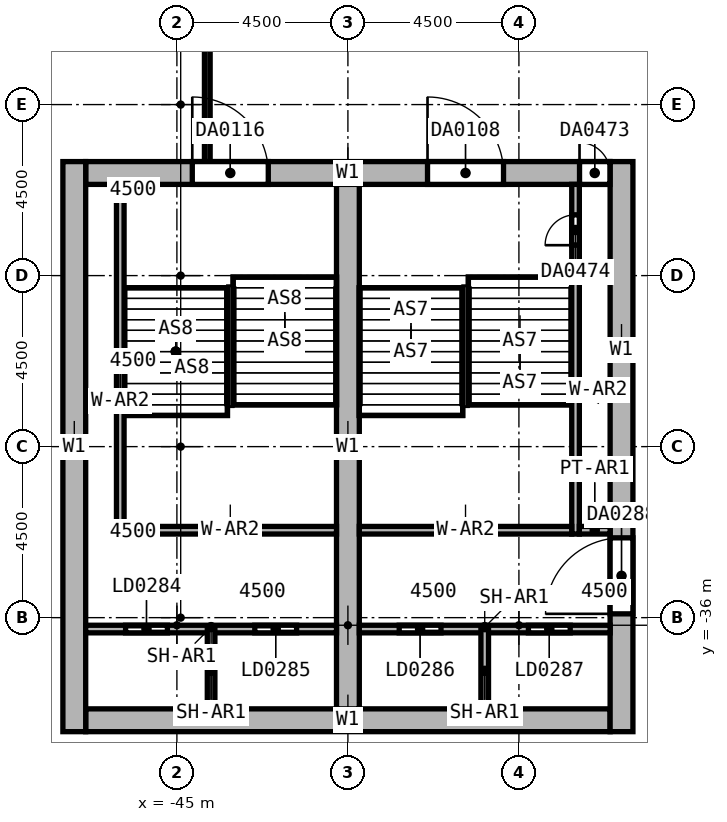
"""IFC4 building model, lengths in metres.
Left out: names, types, materials, properties, quantities, classifications, styles, units other than length and angle.
Written with IfcOpenShell. Run it as: python <this file> out.ifc"""

import sys

from ifc_helpers import new_model, si_unit, direction, frame, frame_2d, origin, place, context, subcontext, project, spatial, rectangle, extrude, element, fill, save


model = new_model("IFC4")
c1 = context("Model", 3, precision=1e-05, world=origin(), true_north=direction((0.0, 1.0)))
c2 = subcontext(c1, "Body", "Model", "MODEL_VIEW")
j1 = project(units=[si_unit("LENGTHUNIT", "METRE"), si_unit("PLANEANGLEUNIT", "RADIAN")], contexts=[c1])
p1 = place(None, origin())
s1 = spatial("IfcSite", under=j1, at=p1, CompositionType="ELEMENT")
p2 = place(p1, origin())
s2 = spatial("IfcBuilding", under=s1, at=p2, CompositionType="ELEMENT")
p3 = place(p2, frame((0.0, 0.0, 52.0)))
s3 = spatial("IfcBuildingStorey", under=s2, at=p3, CompositionType="ELEMENT", Elevation=52.0)
p4 = place(p3, frame((-47.4, -24.3, 0.0), z_axis=(0.0, 0.0, 1.0), x_axis=(1.0, 0.0, 0.0)))
e1 = element("IfcWall", 1, at=p4, inside=s3, PredefinedType="SHEAR", context=c2, shape_type="SweptSolid", body=[
    extrude(rectangle(XDim=13.8, YDim=0.6, at=frame_2d((6.9, 0.0))), origin(), (0.0, 0.0, 1.0), 8.0),
])
p5 = place(p4, frame((8.995, 0.0, 0.0)))
e2 = element("IfcOpeningElement", 2, at=p5, cuts=e1, PredefinedType="OPENING", context=c2, shape_type="SweptSolid", body=[
    extrude(rectangle(XDim=2.0, YDim=2.4, at=frame_2d((1.0, 1.2))), frame((0.0, 0.3, 0.0), z_axis=(0.0, -1.0, 0.0), x_axis=(1.0, 0.0, 0.0)), (0.0, 0.0, 1.0), 0.6),
])
p6 = place(p4, frame((2.805, 0.0, 0.0)))
e3 = element("IfcOpeningElement", 3, at=p6, cuts=e1, PredefinedType="OPENING", context=c2, shape_type="SweptSolid", body=[
    extrude(rectangle(XDim=2.0, YDim=2.4, at=frame_2d((1.0, 1.2))), frame((0.0, 0.3, 0.0), z_axis=(0.0, -1.0, 0.0), x_axis=(1.0, 0.0, 0.0)), (0.0, 0.0, 1.0), 0.6),
])
p7 = place(p4, frame((12.995, 0.0, 0.0)))
e4 = element("IfcOpeningElement", 4, at=p7, cuts=e1, PredefinedType="OPENING", context=c2, shape_type="SweptSolid", body=[
    extrude(rectangle(XDim=0.8, YDim=2.1, at=frame_2d((0.4, 1.05))), frame((0.0, 0.3, 0.0), z_axis=(0.0, -1.0, 0.0), x_axis=(1.0, 0.0, 0.0)), (0.0, 0.0, 1.0), 0.6),
])
p8 = place(p3, frame((-47.4, -38.7, 0.0), z_axis=(0.0, 0.0, 1.0), x_axis=(1.0, 0.0, 0.0)))
e5 = element("IfcWall", 5, at=p8, inside=s3, PredefinedType="SHEAR", context=c2, shape_type="SweptSolid", body=[
    extrude(rectangle(XDim=13.8, YDim=0.6, at=frame_2d((6.9, 0.0))), origin(), (0.0, 0.0, 1.0), 8.0),
])
p9 = place(p3, frame((-47.7, -39.0, 0.0), z_axis=(0.0, 0.0, 1.0), x_axis=(0.0, 1.0, 0.0)))
e6 = element("IfcWall", 6, at=p9, inside=s3, PredefinedType="SHEAR", context=c2, shape_type="SweptSolid", body=[
    extrude(rectangle(XDim=15.0, YDim=0.6, at=frame_2d((7.5, 0.0))), origin(), (0.0, 0.0, 1.0), 8.0),
])
p10 = place(p3, frame((-33.3, -39.0, 0.0), z_axis=(0.0, 0.0, 1.0), x_axis=(0.0, 1.0, 0.0)))
e7 = element("IfcWall", 7, at=p10, inside=s3, PredefinedType="SHEAR", context=c2, shape_type="SweptSolid", body=[
    extrude(rectangle(XDim=15.0, YDim=0.6, at=frame_2d((7.5, 0.0))), origin(), (0.0, 0.0, 1.0), 8.0),
])
p11 = place(p10, frame((3.1, 0.0, 0.0)))
e8 = element("IfcOpeningElement", 8, at=p11, cuts=e7, PredefinedType="OPENING", context=c2, shape_type="SweptSolid", body=[
    extrude(rectangle(XDim=2.0, YDim=2.4, at=frame_2d((1.0, 1.2))), frame((0.0, 0.3, 0.0), z_axis=(0.0, -1.0, 0.0), x_axis=(1.0, 0.0, 0.0)), (0.0, 0.0, 1.0), 0.6),
])
p12 = place(p3, frame((-40.5, -38.4, 0.0), z_axis=(0.0, 0.0, 1.0), x_axis=(0.0, 1.0, 0.0)))
e9 = element("IfcWall", 9, at=p12, inside=s3, PredefinedType="SHEAR", context=c2, shape_type="SweptSolid", body=[
    extrude(rectangle(XDim=13.8, YDim=0.6, at=frame_2d((6.9, 0.0))), origin(), (0.0, 0.0, 1.0), 8.0),
])
p13 = place(p3, frame((-34.51, -33.8, 0.0), z_axis=(0.0, 0.0, 1.0), x_axis=(0.0, 1.0, 0.0)))
e10 = element("IfcWall", 10, at=p13, inside=s3, PredefinedType="SOLIDWALL", context=c2, shape_type="SweptSolid", body=[
    extrude(rectangle(XDim=9.2, YDim=0.2, at=frame_2d((4.6, 0.0))), origin(), (0.0, 0.0, 1.0), 8.0),
])
p14 = place(p13, frame((7.6, 0.0, 0.0)))
e11 = element("IfcOpeningElement", 11, at=p14, cuts=e10, PredefinedType="OPENING", context=c2, shape_type="SweptSolid", body=[
    extrude(rectangle(XDim=0.8, YDim=2.1, at=frame_2d((0.4, 1.05))), frame((0.0, 0.1, 0.0), z_axis=(0.0, -1.0, 0.0), x_axis=(1.0, 0.0, 0.0)), (0.0, 0.0, 1.0), 0.2),
])
p15 = place(p3, frame((-40.2, -33.7, 0.0), z_axis=(0.0, 0.0, 1.0), x_axis=(1.0, 0.0, 0.0)))
e12 = element("IfcWall", 12, at=p15, inside=s3, PredefinedType="SOLIDWALL", context=c2, shape_type="SweptSolid", body=[
    extrude(rectangle(XDim=5.59, YDim=0.2, at=frame_2d((2.795, 0.0))), origin(), (0.0, 0.0, 1.0), 8.0),
])
p16 = place(p3, frame((-46.49, -33.8, 0.0), z_axis=(0.0, 0.0, 1.0), x_axis=(0.0, 1.0, 0.0)))
e13 = element("IfcWall", 13, at=p16, inside=s3, PredefinedType="SOLIDWALL", context=c2, shape_type="SweptSolid", body=[
    extrude(rectangle(XDim=9.2, YDim=0.2, at=frame_2d((4.6, 0.0))), origin(), (0.0, 0.0, 1.0), 8.0),
])
p17 = place(p3, frame((-46.39, -33.7, 0.0), z_axis=(0.0, 0.0, 1.0), x_axis=(1.0, 0.0, 0.0)))
e14 = element("IfcWall", 14, at=p17, inside=s3, PredefinedType="SOLIDWALL", context=c2, shape_type="SweptSolid", body=[
    extrude(rectangle(XDim=5.59, YDim=0.2, at=frame_2d((2.795, 0.0))), origin(), (0.0, 0.0, 1.0), 8.0),
])
p18 = place(p3, frame((-47.4, -36.3, 0.0), z_axis=(0.0, 0.0, 1.0), x_axis=(1.0, 0.0, 0.0)))
e15 = element("IfcWall", 15, at=p18, inside=s3, PredefinedType="SHEAR", context=c2, shape_type="SweptSolid", body=[
    extrude(rectangle(XDim=6.6, YDim=0.2, at=frame_2d((3.3, 0.0))), origin(), (0.0, 0.0, 1.0), 8.0),
])
p19 = place(p18, frame((1.05, 0.0, 0.0)))
e16 = element("IfcOpeningElement", 16, at=p19, cuts=e15, PredefinedType="OPENING", context=c2, shape_type="SweptSolid", body=[
    extrude(rectangle(XDim=1.1, YDim=2.4, at=frame_2d((0.55, 1.2))), frame((0.0, 0.1, 0.0), z_axis=(0.0, -1.0, 0.0), x_axis=(1.0, 0.0, 0.0)), (0.0, 0.0, 1.0), 0.2),
])
p20 = place(p18, frame((4.45, 0.0, 0.0)))
e17 = element("IfcOpeningElement", 17, at=p20, cuts=e15, PredefinedType="OPENING", context=c2, shape_type="SweptSolid", body=[
    extrude(rectangle(XDim=1.1, YDim=2.4, at=frame_2d((0.55, 1.2))), frame((0.0, 0.1, 0.0), z_axis=(0.0, -1.0, 0.0), x_axis=(1.0, 0.0, 0.0)), (0.0, 0.0, 1.0), 0.2),
])
p21 = place(p3, frame((-40.2, -36.3, 0.0), z_axis=(0.0, 0.0, 1.0), x_axis=(1.0, 0.0, 0.0)))
e18 = element("IfcWall", 18, at=p21, inside=s3, PredefinedType="SHEAR", context=c2, shape_type="SweptSolid", body=[
    extrude(rectangle(XDim=6.6, YDim=0.2, at=frame_2d((3.3, 0.0))), origin(), (0.0, 0.0, 1.0), 8.0),
])
p22 = place(p21, frame((1.05, 0.0, 0.0)))
e19 = element("IfcOpeningElement", 19, at=p22, cuts=e18, PredefinedType="OPENING", context=c2, shape_type="SweptSolid", body=[
    extrude(rectangle(XDim=1.1, YDim=2.4, at=frame_2d((0.55, 1.2))), frame((0.0, 0.1, 0.0), z_axis=(0.0, -1.0, 0.0), x_axis=(1.0, 0.0, 0.0)), (0.0, 0.0, 1.0), 0.2),
])
p23 = place(p21, frame((4.45, 0.0, 0.0)))
e20 = element("IfcOpeningElement", 20, at=p23, cuts=e18, PredefinedType="OPENING", context=c2, shape_type="SweptSolid", body=[
    extrude(rectangle(XDim=1.1, YDim=2.4, at=frame_2d((0.55, 1.2))), frame((0.0, 0.1, 0.0), z_axis=(0.0, -1.0, 0.0), x_axis=(1.0, 0.0, 0.0)), (0.0, 0.0, 1.0), 0.2),
])
for number, where, z_axis, x_axis in (
    (21, (-36.9, -38.4, 0.0), (0.0, 0.0, 1.0), (0.0, 1.0, 0.0)),
    (22, (-44.1, -38.4, 0.0), (0.0, 0.0, 1.0), (0.0, 1.0, 0.0)),
):
    element("IfcWall", number, at=place(p3, frame(where, z_axis=z_axis, x_axis=x_axis)), inside=s3, PredefinedType="SHEAR", context=c2, shape_type="SweptSolid", body=[
        extrude(rectangle(XDim=2.1, YDim=0.2, at=frame_2d((1.05, 0.0))), origin(), (0.0, 0.0, 1.0), 8.0),
    ])
p24 = place(p3, frame((-34.41, -33.7, 0.0), z_axis=(0.0, 0.0, 1.0), x_axis=(1.0, 0.0, 0.0)))
e23 = element("IfcWall", 23, at=p24, inside=s3, PredefinedType="PARTITIONING", context=c2, shape_type="SweptSolid", body=[
    extrude(rectangle(XDim=0.81, YDim=0.2, at=frame_2d((0.405, 0.0))), origin(), (0.0, 0.0, 1.0), 8.0),
])
p25 = place(p3, frame((-44.2, -24.0, 0.0), z_axis=(0.0, 0.0, 1.0), x_axis=(0.0, 1.0, 0.0)))
e24 = element("IfcWall", 24, at=p25, inside=s3, PredefinedType="SOLIDWALL", context=c2, shape_type="SweptSolid", body=[
    extrude(rectangle(XDim=9.0, YDim=0.15, at=frame_2d((4.5, 0.0))), origin(), (0.0, 0.0, 1.0), 7.7),
])
p26 = place(p5, frame((2.0, 0.0, 0.0), z_axis=(0.0, 0.0, 1.0), x_axis=(-1.0, 0.0, 0.0)))
e25 = element("IfcDoor", 25, at=p26, inside=s3, OperationType="DOUBLE_DOOR_SINGLE_SWING", PredefinedType="DOOR", context=c2, shape_type="SweptSolid", body=[
    extrude(rectangle(XDim=2.0, YDim=2.4, at=frame_2d((1.0, 1.2))), frame((0.0, 0.025, 0.0), z_axis=(0.0, -1.0, 0.0), x_axis=(1.0, 0.0, 0.0)), (0.0, 0.0, 1.0), 0.05),
])
fill(e2, e25)
p27 = place(p6, frame((2.0, 0.0, 0.0), z_axis=(0.0, 0.0, 1.0), x_axis=(-1.0, 0.0, 0.0)))
e26 = element("IfcDoor", 26, at=p27, inside=s3, OperationType="DOUBLE_DOOR_SINGLE_SWING", PredefinedType="DOOR", context=c2, shape_type="SweptSolid", body=[
    extrude(rectangle(XDim=2.0, YDim=2.4, at=frame_2d((1.0, 1.2))), frame((0.0, 0.025, 0.0), z_axis=(0.0, -1.0, 0.0), x_axis=(1.0, 0.0, 0.0)), (0.0, 0.0, 1.0), 0.05),
])
fill(e3, e26)
p28 = place(p19, frame((1.1, 0.0, 0.0), z_axis=(0.0, 0.0, 1.0), x_axis=(-1.0, 0.0, 0.0)))
e27 = element("IfcDoor", 27, at=p28, inside=s3, OperationType="DOUBLE_DOOR_SLIDING", PredefinedType="DOOR", context=c2, shape_type="SweptSolid", body=[
    extrude(rectangle(XDim=1.1, YDim=2.4, at=frame_2d((0.55, 1.2))), frame((0.0, 0.025, 0.0), z_axis=(0.0, -1.0, 0.0), x_axis=(1.0, 0.0, 0.0)), (0.0, 0.0, 1.0), 0.05),
])
fill(e16, e27)
p29 = place(p20, frame((1.1, 0.0, 0.0), z_axis=(0.0, 0.0, 1.0), x_axis=(-1.0, 0.0, 0.0)))
e28 = element("IfcDoor", 28, at=p29, inside=s3, OperationType="DOUBLE_DOOR_SLIDING", PredefinedType="DOOR", context=c2, shape_type="SweptSolid", body=[
    extrude(rectangle(XDim=1.1, YDim=2.4, at=frame_2d((0.55, 1.2))), frame((0.0, 0.025, 0.0), z_axis=(0.0, -1.0, 0.0), x_axis=(1.0, 0.0, 0.0)), (0.0, 0.0, 1.0), 0.05),
])
fill(e17, e28)
p30 = place(p22, frame((1.1, 0.0, 0.0), z_axis=(0.0, 0.0, 1.0), x_axis=(-1.0, 0.0, 0.0)))
e29 = element("IfcDoor", 29, at=p30, inside=s3, OperationType="DOUBLE_DOOR_SLIDING", PredefinedType="DOOR", context=c2, shape_type="SweptSolid", body=[
    extrude(rectangle(XDim=1.1, YDim=2.4, at=frame_2d((0.55, 1.2))), frame((0.0, 0.025, 0.0), z_axis=(0.0, -1.0, 0.0), x_axis=(1.0, 0.0, 0.0)), (0.0, 0.0, 1.0), 0.05),
])
fill(e19, e29)
p31 = place(p23, frame((1.1, 0.0, 0.0), z_axis=(0.0, 0.0, 1.0), x_axis=(-1.0, 0.0, 0.0)))
e30 = element("IfcDoor", 30, at=p31, inside=s3, OperationType="DOUBLE_DOOR_SLIDING", PredefinedType="DOOR", context=c2, shape_type="SweptSolid", body=[
    extrude(rectangle(XDim=1.1, YDim=2.4, at=frame_2d((0.55, 1.2))), frame((0.0, 0.025, 0.0), z_axis=(0.0, -1.0, 0.0), x_axis=(1.0, 0.0, 0.0)), (0.0, 0.0, 1.0), 0.05),
])
fill(e20, e30)
p32 = place(p11, origin())
e31 = element("IfcDoor", 31, at=p32, inside=s3, OperationType="DOUBLE_DOOR_SINGLE_SWING", PredefinedType="DOOR", context=c2, shape_type="SweptSolid", body=[
    extrude(rectangle(XDim=2.0, YDim=2.4, at=frame_2d((1.0, 1.2))), frame((0.0, 0.025, 0.0), z_axis=(0.0, -1.0, 0.0), x_axis=(1.0, 0.0, 0.0)), (0.0, 0.0, 1.0), 0.05),
])
fill(e8, e31)
p33 = place(p7, origin())
e32 = element("IfcDoor", 32, at=p33, inside=s3, OperationType="SINGLE_SWING_LEFT", PredefinedType="DOOR", context=c2, shape_type="SweptSolid", body=[
    extrude(rectangle(XDim=0.8, YDim=2.1, at=frame_2d((0.4, 1.05))), frame((0.0, 0.025, 0.0), z_axis=(0.0, -1.0, 0.0), x_axis=(1.0, 0.0, 0.0)), (0.0, 0.0, 1.0), 0.05),
])
fill(e4, e32)
p34 = place(p14, origin())
e33 = element("IfcDoor", 33, at=p34, inside=s3, OperationType="SINGLE_SWING_LEFT", PredefinedType="DOOR", context=c2, shape_type="SweptSolid", body=[
    extrude(rectangle(XDim=0.8, YDim=2.1, at=frame_2d((0.4, 1.05))), frame((0.0, 0.025, 0.0), z_axis=(0.0, -1.0, 0.0), x_axis=(1.0, 0.0, 0.0)), (0.0, 0.0, 1.0), 0.05),
])
fill(e11, e33)
save(model, sys.argv[1])
